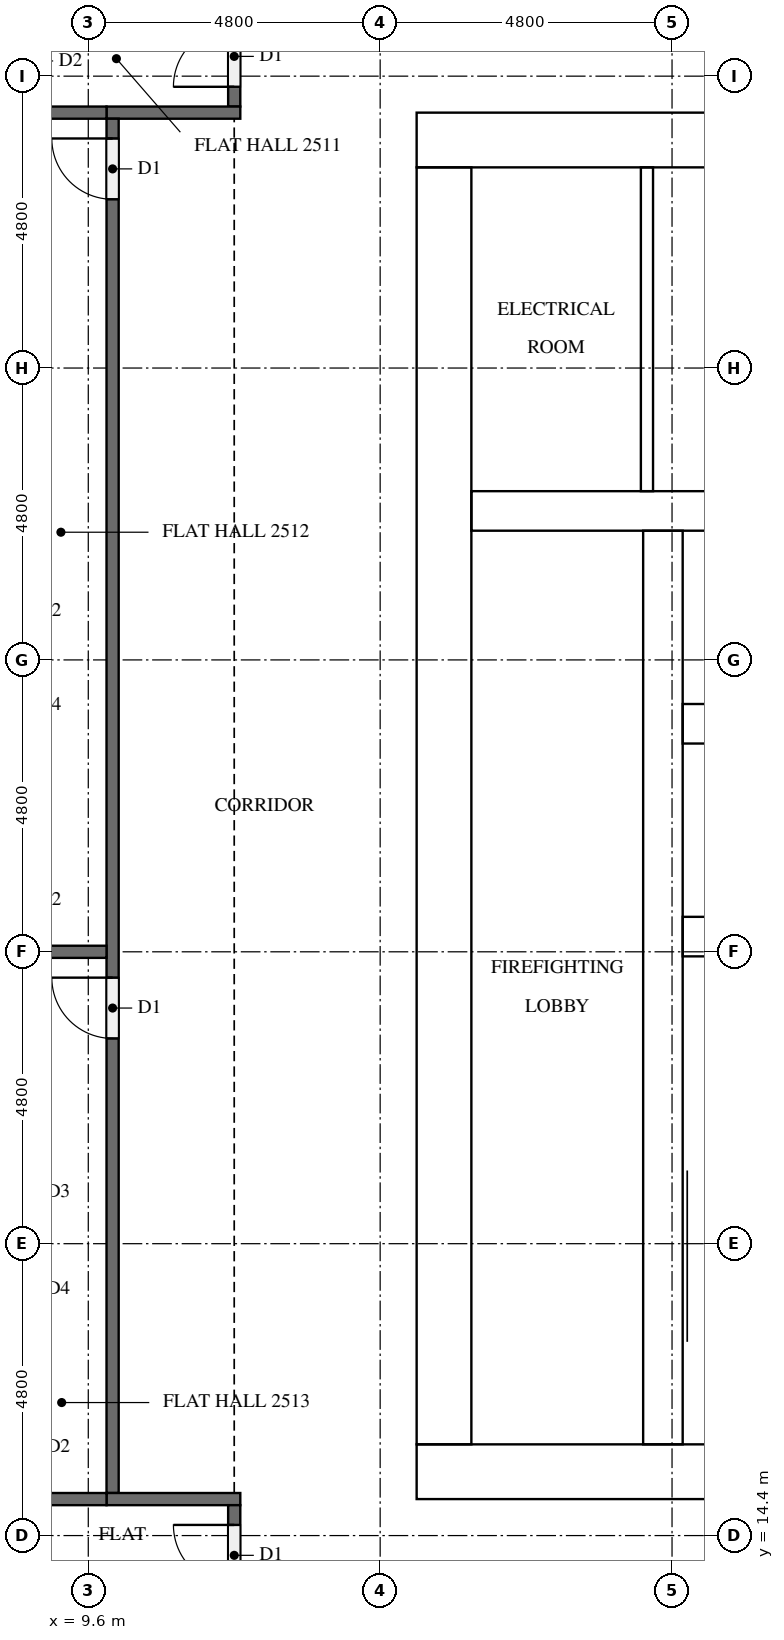
"""IFC4 building model, lengths in metres.
Left out: names, types, materials, properties, quantities, classifications, styles, units other than length and angle.
Written with IfcOpenShell. Run it as: python <this file> out.ifc"""

import sys

from ifc_helpers import new_model, si_unit, direction, frame, frame_2d, origin, place, context, subcontext, project, spatial, rectangle, extrude, element, fill, save


model = new_model("IFC4")
c1 = context("Model", 3, precision=1e-05, world=origin(), true_north=direction((0.0, 1.0)))
c2 = subcontext(c1, "Body", "Model", "MODEL_VIEW")
j1 = project(units=[si_unit("LENGTHUNIT", "METRE"), si_unit("PLANEANGLEUNIT", "RADIAN")], contexts=[c1])
p1 = place(None, origin())
s1 = spatial("IfcSite", under=j1, at=p1, CompositionType="ELEMENT")
p2 = place(p1, origin())
s2 = spatial("IfcBuilding", under=s1, at=p2, CompositionType="ELEMENT")
p3 = place(p2, frame((0.0, 0.0, 99.7)))
s3 = spatial("IfcBuildingStorey", under=s2, at=p3, CompositionType="ELEMENT", Elevation=99.7)
p4 = place(p3, frame((15.0, 15.45, 0.0), z_axis=(0.0, 0.0, 1.0), x_axis=(1.0, 0.0, 0.0)))
e1 = element("IfcWall", 1, at=p4, inside=s3, PredefinedType="SHEAR", context=c2, shape_type="SweptSolid", body=[
    extrude(rectangle(XDim=32.4, YDim=0.9, at=frame_2d((16.2, 0.0))), origin(), (0.0, 0.0, 1.0), 3.2),
])
p5 = place(p4, frame((15.3, 0.0, 0.0)))
e2 = element("IfcOpeningElement", 2, at=p5, cuts=e1, PredefinedType="OPENING", context=c2, shape_type="SweptSolid", body=[
    extrude(rectangle(XDim=1.8, YDim=2.1, at=frame_2d((0.9, 1.05))), frame((0.0, 0.46, 0.0), z_axis=(0.0, -1.0, 0.0), x_axis=(1.0, 0.0, 0.0)), (0.0, 0.0, 1.0), 0.92),
])
p6 = place(p3, frame((15.0, 37.35, 0.0), z_axis=(0.0, 0.0, 1.0), x_axis=(1.0, 0.0, 0.0)))
e3 = element("IfcWall", 3, at=p6, inside=s3, PredefinedType="SHEAR", context=c2, shape_type="SweptSolid", body=[
    extrude(rectangle(XDim=32.4, YDim=0.9, at=frame_2d((16.2, 0.0))), origin(), (0.0, 0.0, 1.0), 3.2),
])
p7 = place(p6, frame((15.3, 0.0, 0.0)))
e4 = element("IfcOpeningElement", 4, at=p7, cuts=e3, PredefinedType="OPENING", context=c2, shape_type="SweptSolid", body=[
    extrude(rectangle(XDim=1.8, YDim=2.1, at=frame_2d((0.9, 1.05))), frame((0.0, 0.46, 0.0), z_axis=(0.0, -1.0, 0.0), x_axis=(1.0, 0.0, 0.0)), (0.0, 0.0, 1.0), 0.92),
])
p8 = place(p6, frame((1.794, 0.0, 0.0)))
e5 = element("IfcOpeningElement", 5, at=p8, cuts=e3, PredefinedType="OPENING", context=c2, shape_type="SweptSolid", body=[
    extrude(rectangle(XDim=1.0, YDim=2.1, at=frame_2d((0.5, 1.05))), frame((0.0, 0.46, 0.0), z_axis=(0.0, -1.0, 0.0), x_axis=(1.0, 0.0, 0.0)), (0.0, 0.0, 1.0), 0.92),
])
p9 = place(p6, frame((5.331, 0.0, 0.0)))
e6 = element("IfcOpeningElement", 6, at=p9, cuts=e3, PredefinedType="OPENING", context=c2, shape_type="SweptSolid", body=[
    extrude(rectangle(XDim=1.0, YDim=2.1, at=frame_2d((0.5, 1.05))), frame((0.0, 0.46, 0.0), z_axis=(0.0, -1.0, 0.0), x_axis=(1.0, 0.0, 0.0)), (0.0, 0.0, 1.0), 0.92),
])
p10 = place(p3, frame((15.45, 15.9, 0.0), z_axis=(0.0, 0.0, 1.0), x_axis=(0.0, 1.0, 0.0)))
e7 = element("IfcWall", 7, at=p10, inside=s3, PredefinedType="SHEAR", context=c2, shape_type="SweptSolid", body=[
    extrude(rectangle(XDim=21.0, YDim=0.9, at=frame_2d((10.5, 0.0))), origin(), (0.0, 0.0, 1.0), 3.2),
])
p11 = place(p10, frame((4.86, 0.0, 0.0)))
e8 = element("IfcOpeningElement", 8, at=p11, cuts=e7, PredefinedType="OPENING", context=c2, shape_type="SweptSolid", body=[
    extrude(rectangle(XDim=1.2, YDim=2.1, at=frame_2d((0.6, 1.05))), frame((0.0, 0.46, 0.0), z_axis=(0.0, -1.0, 0.0), x_axis=(1.0, 0.0, 0.0)), (0.0, 0.0, 1.0), 0.92),
])
p12 = place(p3, frame((19.05, 15.9, 0.0), z_axis=(0.0, 0.0, 1.0), x_axis=(0.0, 1.0, 0.0)))
e9 = element("IfcWall", 9, at=p12, inside=s3, PredefinedType="SHEAR", context=c2, shape_type="SweptSolid", body=[
    extrude(rectangle(XDim=15.025, YDim=0.65, at=frame_2d((7.513, 0.0))), origin(), (0.0, 0.0, 1.0), 3.2),
])
p13 = place(p12, frame((9.55, 0.0, 0.0)))
e10 = element("IfcOpeningElement", 10, at=p13, cuts=e9, PredefinedType="OPENING", context=c2, shape_type="SweptSolid", body=[
    extrude(rectangle(XDim=1.1, YDim=2.1, at=frame_2d((0.55, 1.05))), frame((0.0, 0.335, 0.0), z_axis=(0.0, -1.0, 0.0), x_axis=(1.0, 0.0, 0.0)), (0.0, 0.0, 1.0), 0.67),
])
p14 = place(p12, frame((13.05, 0.0, 0.0)))
e11 = element("IfcOpeningElement", 11, at=p14, cuts=e9, PredefinedType="OPENING", context=c2, shape_type="SweptSolid", body=[
    extrude(rectangle(XDim=1.1, YDim=2.1, at=frame_2d((0.55, 1.05))), frame((0.0, 0.335, 0.0), z_axis=(0.0, -1.0, 0.0), x_axis=(1.0, 0.0, 0.0)), (0.0, 0.0, 1.0), 0.67),
])
p15 = place(p12, frame((0.3, 0.0, 0.0)))
e12 = element("IfcOpeningElement", 12, at=p15, cuts=e9, PredefinedType="OPENING", context=c2, shape_type="SweptSolid", body=[
    extrude(rectangle(XDim=1.2, YDim=2.1, at=frame_2d((0.6, 1.05))), frame((0.0, 0.335, 0.0), z_axis=(0.0, -1.0, 0.0), x_axis=(1.0, 0.0, 0.0)), (0.0, 0.0, 1.0), 0.67),
])
for number, where, z_axis, x_axis in (
    (13, (19.375, 24.25, 0.0), (0.0, 0.0, 1.0), (1.0, 0.0, 0.0)),
    (14, (19.375, 27.75, 0.0), (0.0, 0.0, 1.0), (1.0, 0.0, 0.0)),
):
    element("IfcWall", number, at=place(p3, frame(where, z_axis=z_axis, x_axis=x_axis)), inside=s3, PredefinedType="SHEAR", context=c2, shape_type="SweptSolid", body=[
        extrude(rectangle(XDim=3.4, YDim=0.65, at=frame_2d((1.7, 0.0))), origin(), (0.0, 0.0, 1.0), 3.2),
    ])
p16 = place(p3, frame((15.9, 31.25, 0.0), z_axis=(0.0, 0.0, 1.0), x_axis=(1.0, 0.0, 0.0)))
e15 = element("IfcWall", 15, at=p16, inside=s3, PredefinedType="SHEAR", context=c2, shape_type="SweptSolid", body=[
    extrude(rectangle(XDim=6.875, YDim=0.65, at=frame_2d((3.438, 0.0))), origin(), (0.0, 0.0, 1.0), 3.2),
])
p17 = place(p3, frame((18.788, 31.575, 0.0), z_axis=(0.0, 0.0, 1.0), x_axis=(0.0, 1.0, 0.0)))
e16 = element("IfcWall", 16, at=p17, inside=s3, PredefinedType="PARTITIONING", context=c2, shape_type="SweptSolid", body=[
    extrude(rectangle(XDim=5.325, YDim=0.2, at=frame_2d((2.663, 0.0))), origin(), (0.0, 0.0, 1.0), 3.2),
])
p18 = place(p3, frame((12.0, 37.9, 0.0), z_axis=(0.0, 0.0, 1.0), x_axis=(0.0, 1.0, 0.0)))
e17 = element("IfcWall", 17, at=p18, inside=s3, PredefinedType="PARTITIONING", context=c2, shape_type="SweptSolid", body=[
    extrude(rectangle(XDim=2.8, YDim=0.2, at=frame_2d((1.4, 0.0))), origin(), (0.0, 0.0, 1.0), 3.2),
])
p19 = place(p18, frame((0.325, 0.0, 0.0)))
e18 = element("IfcOpeningElement", 18, at=p19, cuts=e17, PredefinedType="OPENING", context=c2, shape_type="SweptSolid", body=[
    extrude(rectangle(XDim=1.0, YDim=2.1, at=frame_2d((0.5, 1.05))), frame((0.0, 0.11, 0.0), z_axis=(0.0, -1.0, 0.0), x_axis=(1.0, 0.0, 0.0)), (0.0, 0.0, 1.0), 0.22),
])
p20 = place(p3, frame((12.1, 37.8, 0.0), z_axis=(0.0, 0.0, 1.0), x_axis=(-1.0, 0.0, 0.0)))
e19 = element("IfcWall", 19, at=p20, inside=s3, PredefinedType="PARTITIONING", context=c2, shape_type="SweptSolid", body=[
    extrude(rectangle(XDim=2.2, YDim=0.2, at=frame_2d((1.1, 0.0))), origin(), (0.0, 0.0, 1.0), 3.2),
])
p21 = place(p3, frame((10.0, 15.1, 0.0), z_axis=(0.0, 0.0, 1.0), x_axis=(0.0, 1.0, 0.0)))
e20 = element("IfcWall", 20, at=p21, inside=s3, PredefinedType="PARTITIONING", context=c2, shape_type="SweptSolid", body=[
    extrude(rectangle(XDim=22.6, YDim=0.2, at=frame_2d((11.3, 0.0))), origin(), (0.0, 0.0, 1.0), 3.2),
])
p22 = place(p21, frame((21.275, 0.0, 0.0)))
e21 = element("IfcOpeningElement", 21, at=p22, cuts=e20, PredefinedType="OPENING", context=c2, shape_type="SweptSolid", body=[
    extrude(rectangle(XDim=1.0, YDim=2.1, at=frame_2d((0.5, 1.05))), frame((0.0, 0.11, 0.0), z_axis=(0.0, -1.0, 0.0), x_axis=(1.0, 0.0, 0.0)), (0.0, 0.0, 1.0), 0.22),
])
p23 = place(p21, frame((7.475, 0.0, 0.0)))
e22 = element("IfcOpeningElement", 22, at=p23, cuts=e20, PredefinedType="OPENING", context=c2, shape_type="SweptSolid", body=[
    extrude(rectangle(XDim=1.0, YDim=2.1, at=frame_2d((0.5, 1.05))), frame((0.0, 0.11, 0.0), z_axis=(0.0, -1.0, 0.0), x_axis=(1.0, 0.0, 0.0)), (0.0, 0.0, 1.0), 0.22),
])
p24 = place(p3, frame((9.9, 15.0, 0.0), z_axis=(0.0, 0.0, 1.0), x_axis=(1.0, 0.0, 0.0)))
e23 = element("IfcWall", 23, at=p24, inside=s3, PredefinedType="PARTITIONING", context=c2, shape_type="SweptSolid", body=[
    extrude(rectangle(XDim=2.2, YDim=0.2, at=frame_2d((1.1, 0.0))), origin(), (0.0, 0.0, 1.0), 3.2),
])
p25 = place(p3, frame((12.0, 12.1, 0.0), z_axis=(0.0, 0.0, 1.0), x_axis=(0.0, 1.0, 0.0)))
e24 = element("IfcWall", 24, at=p25, inside=s3, PredefinedType="PARTITIONING", context=c2, shape_type="SweptSolid", body=[
    extrude(rectangle(XDim=2.8, YDim=0.2, at=frame_2d((1.4, 0.0))), origin(), (0.0, 0.0, 1.0), 3.2),
])
p26 = place(p25, frame((1.475, 0.0, 0.0)))
e25 = element("IfcOpeningElement", 25, at=p26, cuts=e24, PredefinedType="OPENING", context=c2, shape_type="SweptSolid", body=[
    extrude(rectangle(XDim=1.0, YDim=2.1, at=frame_2d((0.5, 1.05))), frame((0.0, 0.11, 0.0), z_axis=(0.0, -1.0, 0.0), x_axis=(1.0, 0.0, 0.0)), (0.0, 0.0, 1.0), 0.22),
])
p27 = place(p3, frame((5.225, 37.8, 0.0), z_axis=(0.0, 0.0, 1.0), x_axis=(1.0, 0.0, 0.0)))
e26 = element("IfcWall", 26, at=p27, inside=s3, PredefinedType="PARTITIONING", context=c2, shape_type="SweptSolid", body=[
    extrude(rectangle(XDim=4.675, YDim=0.2, at=frame_2d((2.337, 0.0))), origin(), (0.0, 0.0, 1.0), 3.2),
])
for number, where, z_axis, x_axis in (
    (27, (4.9, 24.0, 0.0), (0.0, 0.0, 1.0), (1.0, 0.0, 0.0)),
    (28, (4.9, 15.0, 0.0), (0.0, 0.0, 1.0), (1.0, 0.0, 0.0)),
):
    element("IfcWall", number, at=place(p3, frame(where, z_axis=z_axis, x_axis=x_axis)), inside=s3, PredefinedType="PARTITIONING", context=c2, shape_type="SweptSolid", body=[
        extrude(rectangle(XDim=5.0, YDim=0.2, at=frame_2d((2.5, 0.0))), origin(), (0.0, 0.0, 1.0), 3.2),
    ])
p28 = place(p13, origin())
e29 = element("IfcDoor", 29, at=p28, inside=s3, OperationType="DOUBLE_DOOR_SLIDING", PredefinedType="DOOR", context=c2, shape_type="SweptSolid", body=[
    extrude(rectangle(XDim=1.1, YDim=2.1, at=frame_2d((0.55, 1.05))), frame((0.0, 0.025, 0.0), z_axis=(0.0, -1.0, 0.0), x_axis=(1.0, 0.0, 0.0)), (0.0, 0.0, 1.0), 0.05),
])
fill(e10, e29)
p29 = place(p14, origin())
e30 = element("IfcDoor", 30, at=p29, inside=s3, OperationType="DOUBLE_DOOR_SLIDING", PredefinedType="DOOR", context=c2, shape_type="SweptSolid", body=[
    extrude(rectangle(XDim=1.1, YDim=2.1, at=frame_2d((0.55, 1.05))), frame((0.0, 0.025, 0.0), z_axis=(0.0, -1.0, 0.0), x_axis=(1.0, 0.0, 0.0)), (0.0, 0.0, 1.0), 0.05),
])
fill(e11, e30)
p30 = place(p15, frame((1.2, 0.0, 0.0), z_axis=(0.0, 0.0, 1.0), x_axis=(-1.0, 0.0, 0.0)))
e31 = element("IfcDoor", 31, at=p30, inside=s3, OperationType="SINGLE_SWING_LEFT", PredefinedType="DOOR", context=c2, shape_type="SweptSolid", body=[
    extrude(rectangle(XDim=1.2, YDim=2.1, at=frame_2d((0.6, 1.05))), frame((0.0, 0.025, 0.0), z_axis=(0.0, -1.0, 0.0), x_axis=(1.0, 0.0, 0.0)), (0.0, 0.0, 1.0), 0.05),
])
fill(e12, e31)
p31 = place(p11, frame((1.2, 0.0, 0.0), z_axis=(0.0, 0.0, 1.0), x_axis=(-1.0, 0.0, 0.0)))
e32 = element("IfcDoor", 32, at=p31, inside=s3, OperationType="SINGLE_SWING_RIGHT", PredefinedType="DOOR", context=c2, shape_type="SweptSolid", body=[
    extrude(rectangle(XDim=1.2, YDim=2.1, at=frame_2d((0.6, 1.05))), frame((0.0, 0.025, 0.0), z_axis=(0.0, -1.0, 0.0), x_axis=(1.0, 0.0, 0.0)), (0.0, 0.0, 1.0), 0.05),
])
fill(e8, e32)
p32 = place(p8, origin())
e33 = element("IfcDoor", 33, at=p32, inside=s3, OperationType="SINGLE_SWING_RIGHT", PredefinedType="DOOR", context=c2, shape_type="SweptSolid", body=[
    extrude(rectangle(XDim=1.0, YDim=2.1, at=frame_2d((0.5, 1.05))), frame((0.0, 0.025, 0.0), z_axis=(0.0, -1.0, 0.0), x_axis=(1.0, 0.0, 0.0)), (0.0, 0.0, 1.0), 0.05),
])
fill(e5, e33)
p33 = place(p19, origin())
e34 = element("IfcDoor", 34, at=p33, inside=s3, OperationType="SINGLE_SWING_LEFT", PredefinedType="DOOR", context=c2, shape_type="SweptSolid", body=[
    extrude(rectangle(XDim=1.0, YDim=2.1, at=frame_2d((0.5, 1.05))), frame((0.0, 0.025, 0.0), z_axis=(0.0, -1.0, 0.0), x_axis=(1.0, 0.0, 0.0)), (0.0, 0.0, 1.0), 0.05),
])
fill(e18, e34)
p34 = place(p22, origin())
e35 = element("IfcDoor", 35, at=p34, inside=s3, OperationType="SINGLE_SWING_RIGHT", PredefinedType="DOOR", context=c2, shape_type="SweptSolid", body=[
    extrude(rectangle(XDim=1.0, YDim=2.1, at=frame_2d((0.5, 1.05))), frame((0.0, 0.025, 0.0), z_axis=(0.0, -1.0, 0.0), x_axis=(1.0, 0.0, 0.0)), (0.0, 0.0, 1.0), 0.05),
])
fill(e21, e35)
p35 = place(p23, origin())
e36 = element("IfcDoor", 36, at=p35, inside=s3, OperationType="SINGLE_SWING_RIGHT", PredefinedType="DOOR", context=c2, shape_type="SweptSolid", body=[
    extrude(rectangle(XDim=1.0, YDim=2.1, at=frame_2d((0.5, 1.05))), frame((0.0, 0.025, 0.0), z_axis=(0.0, -1.0, 0.0), x_axis=(1.0, 0.0, 0.0)), (0.0, 0.0, 1.0), 0.05),
])
fill(e22, e36)
p36 = place(p26, origin())
e37 = element("IfcDoor", 37, at=p36, inside=s3, OperationType="SINGLE_SWING_RIGHT", PredefinedType="DOOR", context=c2, shape_type="SweptSolid", body=[
    extrude(rectangle(XDim=1.0, YDim=2.1, at=frame_2d((0.5, 1.05))), frame((0.0, 0.025, 0.0), z_axis=(0.0, -1.0, 0.0), x_axis=(1.0, 0.0, 0.0)), (0.0, 0.0, 1.0), 0.05),
])
fill(e25, e37)
save(model, sys.argv[1])
